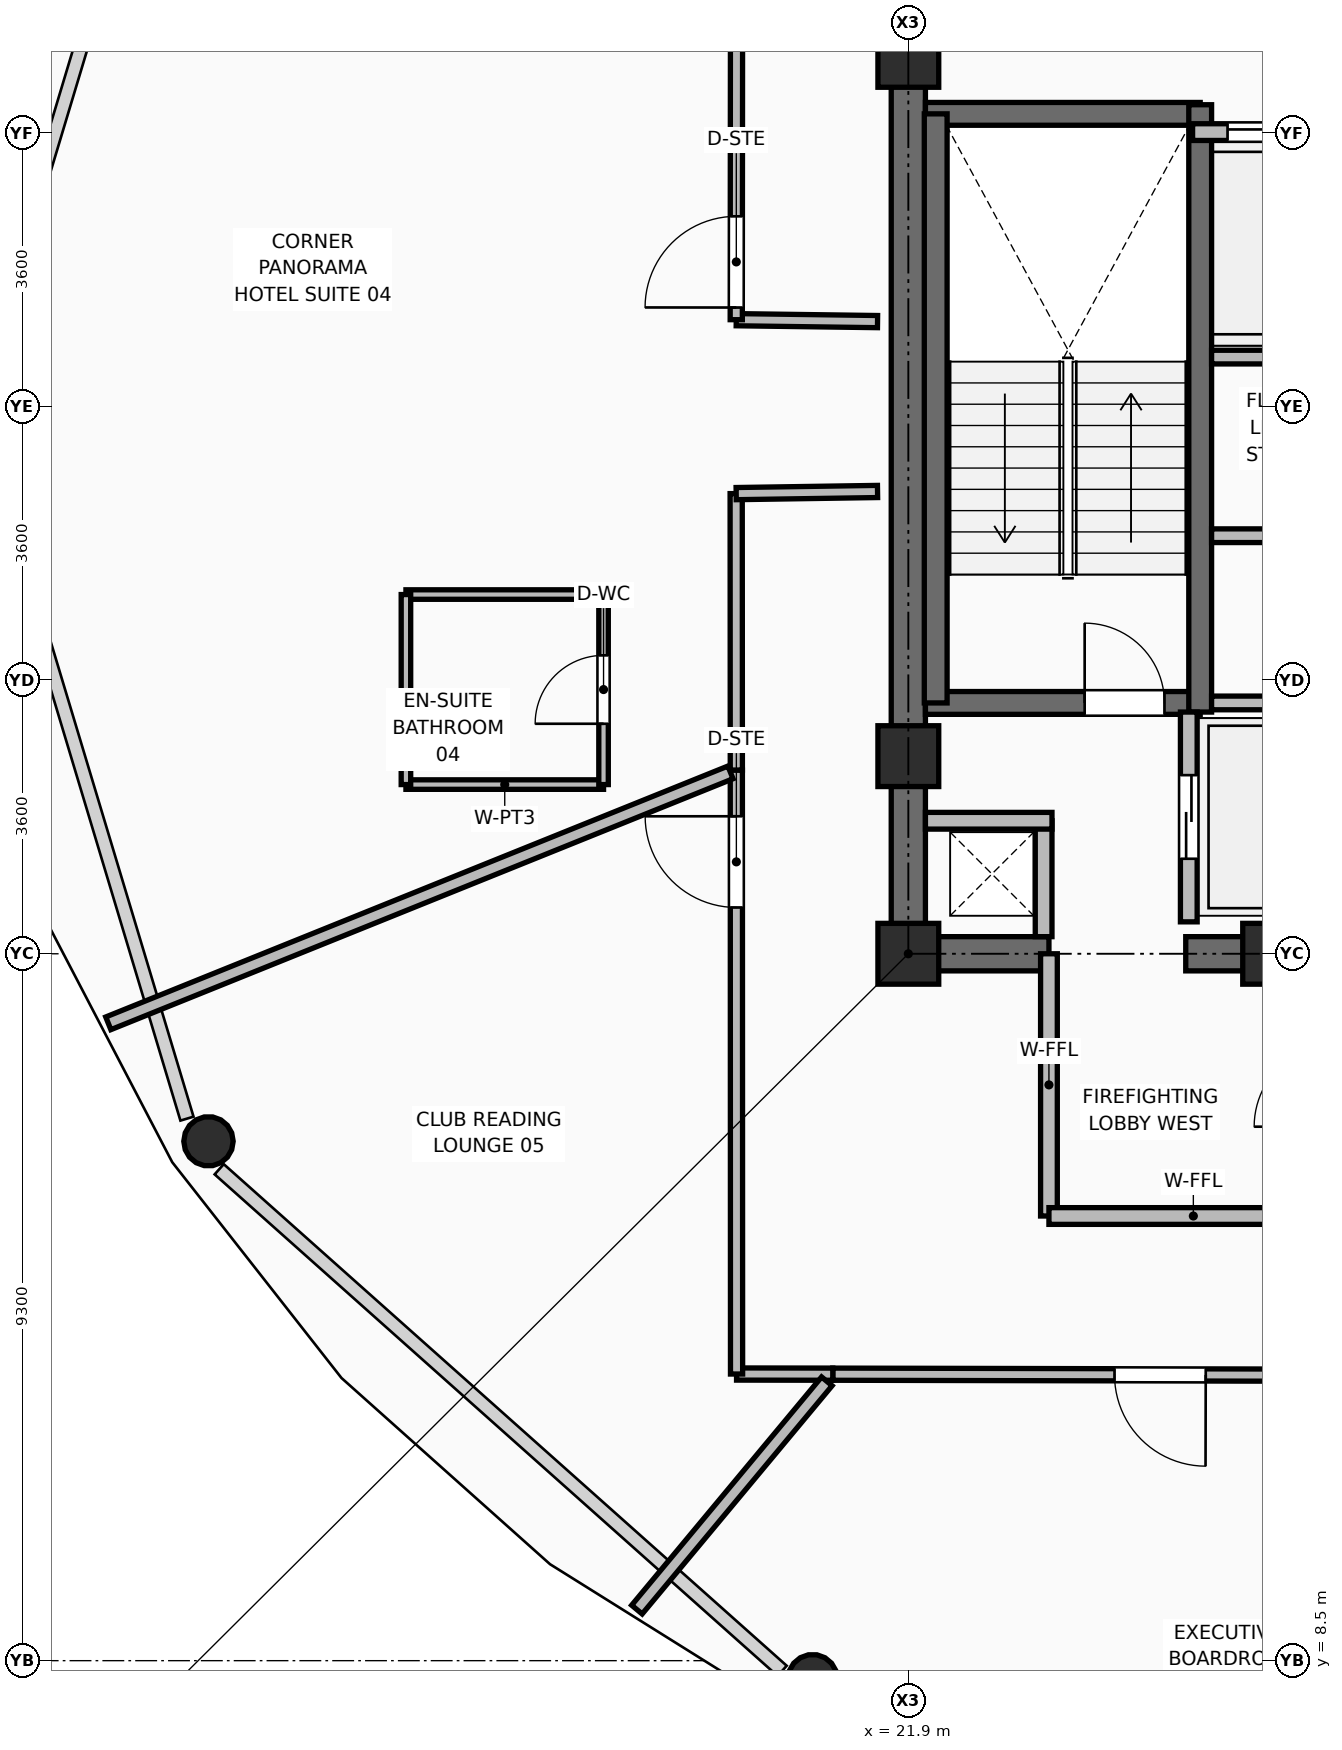
"""IFC4 building model, lengths in metres.
Left out: names, types, materials, properties, quantities, classifications, styles, units other than length and angle.
Written with IfcOpenShell. Run it as: python <this file> out.ifc"""

import sys

from ifc_helpers import new_model, si_unit, direction, frame, frame_2d, origin, origin_2d, place, context, subcontext, project, spatial, rectangle, hollow_circle, extrude, element, fill, save


model = new_model("IFC4")
c1 = context("Model", 3, precision=1e-05, world=origin(), true_north=direction((0.0, 1.0)))
c2 = subcontext(c1, "Body", "Model", "MODEL_VIEW")
j1 = project(units=[si_unit("LENGTHUNIT", "METRE"), si_unit("PLANEANGLEUNIT", "RADIAN")], contexts=[c1])
p1 = place(None, origin())
s1 = spatial("IfcSite", under=j1, at=p1, CompositionType="ELEMENT")
p2 = place(p1, origin())
s2 = spatial("IfcBuilding", under=s1, at=p2, CompositionType="ELEMENT")
p3 = place(p2, frame((0.0, 0.0, 246.15)))
s3 = spatial("IfcBuildingStorey", under=s2, at=p3, CompositionType="ELEMENT", Elevation=246.15)
for number, where, z_axis, x_axis in (
    (1, (21.9, 17.8, 0.0), (0.0, 0.0, 1.0), (1.0, 0.0, 0.0)),
    (2, (26.7, 17.8, 0.0), (0.0, 0.0, 1.0), (1.0, 0.0, 0.0)),
    (3, (21.9, 20.4, 0.0), (0.0, 0.0, 1.0), (1.0, 0.0, 0.0)),
    (4, (21.9, 29.6, 0.0), (0.0, 0.0, 1.0), (1.0, 0.0, 0.0)),
):
    element("IfcColumn", number, at=place(p3, frame(where, z_axis=z_axis, x_axis=x_axis)), inside=s3, PredefinedType="COLUMN", context=c2, shape_type="SweptSolid", body=[
        extrude(rectangle(XDim=0.8, YDim=0.8, at=origin_2d()), origin(), (0.0, 0.0, 1.0), 3.75),
    ])
for number, where, z_axis, x_axis in (
    (5, (12.692, 15.333, 0.0), (0.0, 0.0, 1.0), (1.0, 0.0, 0.0)),
    (6, (20.641, 8.257, 0.0), (0.0, 0.0, 1.0), (1.0, 0.0, 0.0)),
):
    element("IfcColumn", number, at=place(p3, frame(where, z_axis=z_axis, x_axis=x_axis)), inside=s3, PredefinedType="COLUMN", context=c2, shape_type="SweptSolid", body=[
        extrude(hollow_circle(Radius=0.325, WallThickness=0.03, at=origin_2d()), origin(), (0.0, 0.0, 1.0), 3.57),
    ])
p4 = place(p3, frame((21.675, 17.8, 0.0), z_axis=(0.0, 0.0, 1.0), x_axis=(1.0, 0.0, 0.0)))
e7 = element("IfcWall", 7, at=p4, inside=s3, PredefinedType="SHEAR", context=c2, shape_type="SweptSolid", body=[
    extrude(rectangle(XDim=2.075, YDim=0.45, at=frame_2d((1.038, 0.0))), origin(), (0.0, 0.0, 1.0), 3.57),
])
p5 = place(p3, frame((25.55, 17.8, 0.0), z_axis=(0.0, 0.0, 1.0), x_axis=(1.0, 0.0, 0.0)))
e8 = element("IfcWall", 8, at=p5, inside=s3, PredefinedType="SHEAR", context=c2, shape_type="SweptSolid", body=[
    extrude(rectangle(XDim=6.9, YDim=0.45, at=frame_2d((3.45, 0.0))), origin(), (0.0, 0.0, 1.0), 3.57),
])
p6 = place(p3, frame((21.9, 18.025, 0.0), z_axis=(0.0, 0.0, 1.0), x_axis=(0.0, 1.0, 0.0)))
e9 = element("IfcWall", 9, at=p6, inside=s3, PredefinedType="SHEAR", context=c2, shape_type="SweptSolid", body=[
    extrude(rectangle(XDim=14.2, YDim=0.45, at=frame_2d((7.1, 0.0))), origin(), (0.0, 0.0, 1.0), 3.57),
])
p7 = place(p3, frame((22.125, 21.1, 0.0), z_axis=(0.0, 0.0, 1.0), x_axis=(1.0, 0.0, 0.0)))
e10 = element("IfcWall", 10, at=p7, inside=s3, PredefinedType="SHEAR", context=c2, shape_type="SweptSolid", body=[
    extrude(rectangle(XDim=3.615, YDim=0.3, at=frame_2d((1.808, 0.0))), origin(), (0.0, 0.0, 1.0), 3.57),
])
p8 = place(p7, frame((2.095, 0.0, 0.0)))
e11 = element("IfcOpeningElement", 11, at=p8, cuts=e10, PredefinedType="OPENING", context=c2, shape_type="SweptSolid", body=[
    extrude(rectangle(XDim=1.05, YDim=2.1, at=frame_2d((0.525, 1.05))), frame((0.0, 0.16, 0.0), z_axis=(0.0, -1.0, 0.0), x_axis=(1.0, 0.0, 0.0)), (0.0, 0.0, 1.0), 0.32),
])
p9 = place(p3, frame((22.125, 28.85, 0.0), z_axis=(0.0, 0.0, 1.0), x_axis=(1.0, 0.0, 0.0)))
e12 = element("IfcWall", 12, at=p9, inside=s3, PredefinedType="SHEAR", context=c2, shape_type="SweptSolid", body=[
    extrude(rectangle(XDim=3.615, YDim=0.3, at=frame_2d((1.808, 0.0))), origin(), (0.0, 0.0, 1.0), 3.57),
])
p10 = place(p3, frame((25.74, 20.98, 0.0), z_axis=(0.0, 0.0, 1.0), x_axis=(0.0, 1.0, 0.0)))
e13 = element("IfcWall", 13, at=p10, inside=s3, PredefinedType="SHEAR", context=c2, shape_type="SweptSolid", body=[
    extrude(rectangle(XDim=7.99, YDim=0.3, at=frame_2d((3.995, 0.0))), origin(), (0.0, 0.0, 1.0), 3.57),
])
p11 = place(p3, frame((22.26, 21.1, 0.0), z_axis=(0.0, 0.0, 1.0), x_axis=(0.0, 1.0, 0.0)))
e14 = element("IfcWall", 14, at=p11, inside=s3, PredefinedType="SHEAR", context=c2, shape_type="SweptSolid", body=[
    extrude(rectangle(XDim=7.75, YDim=0.3, at=frame_2d((3.875, 0.0))), origin(), (0.0, 0.0, 1.0), 3.57),
])
p12 = place(p3, frame((23.68, 18.025, 0.0), z_axis=(0.0, 0.0, 1.0), x_axis=(0.0, 1.0, 0.0)))
e15 = element("IfcWall", 15, at=p12, inside=s3, PredefinedType="PARTITIONING", context=c2, shape_type="SweptSolid", body=[
    extrude(rectangle(XDim=1.525, YDim=0.22, at=frame_2d((0.763, 0.0))), origin(), (0.0, 0.0, 1.0), 3.55),
])
p13 = place(p3, frame((22.125, 19.55, 0.0), z_axis=(0.0, 0.0, 1.0), x_axis=(1.0, 0.0, 0.0)))
e16 = element("IfcWall", 16, at=p13, inside=s3, PredefinedType="PARTITIONING", context=c2, shape_type="SweptSolid", body=[
    extrude(rectangle(XDim=1.665, YDim=0.22, at=frame_2d((0.833, 0.0))), origin(), (0.0, 0.0, 1.0), 2.595),
])
p14 = place(p3, frame((25.59, 18.22, 0.0), z_axis=(0.0, 0.0, 1.0), x_axis=(0.0, 1.0, 0.0)))
e17 = element("IfcWall", 17, at=p14, inside=s3, PredefinedType="PARTITIONING", context=c2, shape_type="SweptSolid", body=[
    extrude(rectangle(XDim=2.76, YDim=0.22, at=frame_2d((1.38, 0.0))), origin(), (0.0, 0.0, 1.0), 3.55),
])
p15 = place(p14, frame((0.83, 0.0, 0.0)))
e18 = element("IfcOpeningElement", 18, at=p15, cuts=e17, PredefinedType="OPENING", context=c2, shape_type="SweptSolid", body=[
    extrude(rectangle(XDim=1.1, YDim=2.2, at=frame_2d((0.55, 1.1))), frame((0.0, 0.12, 0.0), z_axis=(0.0, -1.0, 0.0), x_axis=(1.0, 0.0, 0.0)), (0.0, 0.0, 1.0), 0.24),
])
p16 = place(p3, frame((25.64, 28.61, 0.0), z_axis=(0.0, 0.0, 1.0), x_axis=(1.0, 0.0, 0.0)))
e19 = element("IfcWall", 19, at=p16, inside=s3, PredefinedType="PARTITIONING", context=c2, shape_type="SweptSolid", body=[
    extrude(rectangle(XDim=2.02, YDim=0.22, at=frame_2d((1.01, 0.0))), origin(), (0.0, 0.0, 1.0), 3.55),
])
p17 = place(p16, frame((0.46, 0.0, 0.0)))
e20 = element("IfcOpeningElement", 20, at=p17, cuts=e19, PredefinedType="OPENING", context=c2, shape_type="SweptSolid", body=[
    extrude(rectangle(XDim=1.1, YDim=2.2, at=frame_2d((0.55, 1.1))), frame((0.0, 0.12, 0.0), z_axis=(0.0, -1.0, 0.0), x_axis=(1.0, 0.0, 0.0)), (0.0, 0.0, 1.0), 0.24),
])
for number, where, z_axis, x_axis in (
    (21, (25.89, 21.1, 0.0), (0.0, 0.0, 1.0), (1.0, 0.0, 0.0)),
    (22, (25.89, 25.65, 0.0), (0.0, 0.0, 1.0), (1.0, 0.0, 0.0)),
):
    element("IfcWall", number, at=place(p3, frame(where, z_axis=z_axis, x_axis=x_axis)), inside=s3, PredefinedType="PARTITIONING", context=c2, shape_type="SweptSolid", body=[
        extrude(rectangle(XDim=1.7, YDim=0.18, at=frame_2d((0.85, 0.0))), origin(), (0.0, 0.0, 1.0), 3.55),
    ])
p18 = place(p3, frame((25.89, 23.3, 0.0), z_axis=(0.0, 0.0, 1.0), x_axis=(1.0, 0.0, 0.0)))
e23 = element("IfcWall", 23, at=p18, inside=s3, PredefinedType="PARTITIONING", context=c2, shape_type="SweptSolid", body=[
    extrude(rectangle(XDim=1.79, YDim=0.18, at=frame_2d((0.895, 0.0))), origin(), (0.0, 0.0, 1.0), 3.55),
])
p19 = place(p3, frame((23.75, 14.35, 0.0), z_axis=(0.0, 0.0, 1.0), x_axis=(0.0, 1.0, 0.0)))
e24 = element("IfcWall", 24, at=p19, inside=s3, PredefinedType="PARTITIONING", context=c2, shape_type="SweptSolid", body=[
    extrude(rectangle(XDim=3.45, YDim=0.22, at=frame_2d((1.725, 0.0))), origin(), (0.0, 0.0, 1.0), 3.081),
])
p20 = place(p3, frame((23.75, 14.35, 0.0), z_axis=(0.0, 0.0, 1.0), x_axis=(1.0, 0.0, 0.0)))
e25 = element("IfcWall", 25, at=p20, inside=s3, PredefinedType="PARTITIONING", context=c2, shape_type="SweptSolid", body=[
    extrude(rectangle(XDim=3.8, YDim=0.22, at=frame_2d((1.9, 0.0))), origin(), (0.0, 0.0, 1.0), 3.55),
])
p21 = place(p3, frame((21.495, 26.117, 0.0), z_axis=(0.0, 0.0, 1.0), x_axis=(-0.999908537082, 0.013524698532, 0.0)))
e26 = element("IfcWall", 26, at=p21, inside=s3, PredefinedType="PARTITIONING", context=c2, shape_type="SweptSolid", body=[
    extrude(rectangle(XDim=1.859, YDim=0.16, at=frame_2d((0.93, 0.0))), origin(), (0.0, 0.0, 1.0), 2.595),
])
p22 = place(p3, frame((19.636, 26.142, 0.0), z_axis=(0.0, 0.0, 1.0), x_axis=(0.000920648448, 0.999999576203, 0.0)))
e27 = element("IfcWall", 27, at=p22, inside=s3, PredefinedType="PARTITIONING", context=c2, shape_type="SweptSolid", body=[
    extrude(rectangle(XDim=5.569, YDim=0.16, at=frame_2d((2.784, 0.0))), origin(), (0.0, 0.0, 1.0), 3.55),
])
p23 = place(p22, frame((0.16, 0.0, 0.0)))
e28 = element("IfcOpeningElement", 28, at=p23, cuts=e27, PredefinedType="OPENING", context=c2, shape_type="SweptSolid", body=[
    extrude(rectangle(XDim=1.2, YDim=2.1, at=frame_2d((0.6, 1.05))), frame((0.0, 0.09, 0.0), z_axis=(0.0, -1.0, 0.0), x_axis=(1.0, 0.0, 0.0)), (0.0, 0.0, 1.0), 0.18),
])
p24 = place(p3, frame((29.521, 12.251, 0.0), z_axis=(0.0, 0.0, 1.0), x_axis=(-0.999997801115, 0.002097084968, 0.0)))
e29 = element("IfcWall", 29, at=p24, inside=s3, PredefinedType="PARTITIONING", context=c2, shape_type="SweptSolid", body=[
    extrude(rectangle(XDim=8.615, YDim=0.16, at=frame_2d((4.308, 0.0))), origin(), (0.0, 0.0, 1.0), 3.081),
])
p25 = place(p24, frame((3.708, 0.0, 0.0)))
e30 = element("IfcOpeningElement", 30, at=p25, cuts=e29, PredefinedType="OPENING", context=c2, shape_type="SweptSolid", body=[
    extrude(rectangle(XDim=1.2, YDim=2.1, at=frame_2d((0.6, 1.05))), frame((0.0, 0.09, 0.0), z_axis=(0.0, -1.0, 0.0), x_axis=(1.0, 0.0, 0.0)), (0.0, 0.0, 1.0), 0.18),
])
p26 = place(p3, frame((20.906, 12.269, 0.0), z_axis=(0.0, 0.0, 1.0), x_axis=(-0.999998810172, 0.001542612897, 0.0)))
e31 = element("IfcWall", 31, at=p26, inside=s3, PredefinedType="PARTITIONING", context=c2, shape_type="SweptSolid", body=[
    extrude(rectangle(XDim=1.266, YDim=0.16, at=frame_2d((0.633, 0.0))), origin(), (0.0, 0.0, 1.0), 3.55),
])
p27 = place(p3, frame((19.64, 12.271, 0.0), z_axis=(0.0, 0.0, 1.0), x_axis=(-0.000368697551, 0.999999932031, 0.0)))
e32 = element("IfcWall", 32, at=p27, inside=s3, PredefinedType="PARTITIONING", context=c2, shape_type="SweptSolid", body=[
    extrude(rectangle(XDim=7.946, YDim=0.16, at=frame_2d((3.973, 0.0))), origin(), (0.0, 0.0, 1.0), 3.081),
])
p28 = place(p27, frame((6.138, 0.0, 0.0)))
e33 = element("IfcOpeningElement", 33, at=p28, cuts=e32, PredefinedType="OPENING", context=c2, shape_type="SweptSolid", body=[
    extrude(rectangle(XDim=1.2, YDim=2.1, at=frame_2d((0.6, 1.05))), frame((0.0, 0.09, 0.0), z_axis=(0.0, -1.0, 0.0), x_axis=(1.0, 0.0, 0.0)), (0.0, 0.0, 1.0), 0.18),
])
p29 = place(p3, frame((19.637, 20.217, 0.0), z_axis=(0.0, 0.0, 1.0), x_axis=(-0.000537020799, 0.999999855804, 0.0)))
e34 = element("IfcWall", 34, at=p29, inside=s3, PredefinedType="PARTITIONING", context=c2, shape_type="SweptSolid", body=[
    extrude(rectangle(XDim=3.637, YDim=0.16, at=frame_2d((1.818, 0.0))), origin(), (0.0, 0.0, 1.0), 3.081),
])
p30 = place(p3, frame((19.635, 23.854, 0.0), z_axis=(0.0, 0.0, 1.0), x_axis=(0.999886107392, 0.015092125259, 0.0)))
e35 = element("IfcWall", 35, at=p30, inside=s3, PredefinedType="PARTITIONING", context=c2, shape_type="SweptSolid", body=[
    extrude(rectangle(XDim=1.86, YDim=0.16, at=frame_2d((0.93, 0.0))), origin(), (0.0, 0.0, 1.0), 2.595),
])
p31 = place(p3, frame((19.56, 20.186, 0.0), z_axis=(0.0, 0.0, 1.0), x_axis=(-0.927433425778, -0.37398828959, 0.0)))
e36 = element("IfcWall", 36, at=p31, inside=s3, PredefinedType="PARTITIONING", context=c2, shape_type="SweptSolid", body=[
    extrude(rectangle(XDim=8.827, YDim=0.18, at=frame_2d((4.413, 0.0))), origin(), (0.0, 0.0, 1.0), 2.925),
])
p32 = place(p3, frame((20.828, 12.175, 0.0), z_axis=(0.0, 0.0, 1.0), x_axis=(-0.639631003839, -0.768682105248, 0.0)))
e37 = element("IfcWall", 37, at=p32, inside=s3, PredefinedType="PARTITIONING", context=c2, shape_type="SweptSolid", body=[
    extrude(rectangle(XDim=3.906, YDim=0.18, at=frame_2d((1.953, 0.0))), origin(), (0.0, 0.0, 1.0), 2.925),
])
p33 = place(p3, frame((15.29, 20.026, 0.0), z_axis=(0.0, 0.0, 1.0), x_axis=(1.0, 0.0, 0.0)))
e38 = element("IfcWall", 38, at=p33, inside=s3, PredefinedType="PARTITIONING", context=c2, shape_type="SweptSolid", body=[
    extrude(rectangle(XDim=2.6, YDim=0.125, at=frame_2d((1.3, 0.0))), origin(), (0.0, 0.0, 1.0), 3.55),
])
p34 = place(p3, frame((15.29, 22.526, 0.0), z_axis=(0.0, 0.0, 1.0), x_axis=(1.0, 0.0, 0.0)))
e39 = element("IfcWall", 39, at=p34, inside=s3, PredefinedType="PARTITIONING", context=c2, shape_type="SweptSolid", body=[
    extrude(rectangle(XDim=2.6, YDim=0.125, at=frame_2d((1.3, 0.0))), origin(), (0.0, 0.0, 1.0), 3.081),
])
p35 = place(p3, frame((15.29, 20.026, 0.0), z_axis=(0.0, 0.0, 1.0), x_axis=(0.0, 1.0, 0.0)))
e40 = element("IfcWall", 40, at=p35, inside=s3, PredefinedType="PARTITIONING", context=c2, shape_type="SweptSolid", body=[
    extrude(rectangle(XDim=2.5, YDim=0.125, at=frame_2d((1.25, 0.0))), origin(), (0.0, 0.0, 1.0), 3.55),
])
p36 = place(p3, frame((17.89, 20.026, 0.0), z_axis=(0.0, 0.0, 1.0), x_axis=(0.0, 1.0, 0.0)))
e41 = element("IfcWall", 41, at=p36, inside=s3, PredefinedType="PARTITIONING", context=c2, shape_type="SweptSolid", body=[
    extrude(rectangle(XDim=2.5, YDim=0.125, at=frame_2d((1.25, 0.0))), origin(), (0.0, 0.0, 1.0), 3.081),
])
p37 = place(p36, frame((0.8, 0.0, 0.0)))
e42 = element("IfcOpeningElement", 42, at=p37, cuts=e41, PredefinedType="OPENING", context=c2, shape_type="SweptSolid", body=[
    extrude(rectangle(XDim=0.9, YDim=2.1, at=frame_2d((0.45, 1.05))), frame((0.0, 0.073, 0.0), z_axis=(0.0, -1.0, 0.0), x_axis=(1.0, 0.0, 0.0)), (0.0, 0.0, 1.0), 0.145),
])
p38 = place(p8, origin())
e43 = element("IfcDoor", 43, at=p38, inside=s3, OperationType="SINGLE_SWING_LEFT", PredefinedType="DOOR", context=c2, shape_type="SweptSolid", body=[
    extrude(rectangle(XDim=1.05, YDim=2.1, at=frame_2d((0.525, 1.05))), frame((0.0, 0.025, 0.0), z_axis=(0.0, -1.0, 0.0), x_axis=(1.0, 0.0, 0.0)), (0.0, 0.0, 1.0), 0.05),
])
fill(e11, e43)
p39 = place(p15, origin())
e44 = element("IfcDoor", 44, at=p39, inside=s3, OperationType="DOUBLE_DOOR_SLIDING", PredefinedType="DOOR", context=c2, shape_type="SweptSolid", body=[
    extrude(rectangle(XDim=1.1, YDim=2.2, at=frame_2d((0.55, 1.1))), frame((0.0, 0.025, 0.0), z_axis=(0.0, -1.0, 0.0), x_axis=(1.0, 0.0, 0.0)), (0.0, 0.0, 1.0), 0.05),
])
fill(e18, e44)
p40 = place(p17, origin())
e45 = element("IfcDoor", 45, at=p40, inside=s3, OperationType="DOUBLE_DOOR_SLIDING", PredefinedType="DOOR", context=c2, shape_type="SweptSolid", body=[
    extrude(rectangle(XDim=1.1, YDim=2.2, at=frame_2d((0.55, 1.1))), frame((0.0, 0.025, 0.0), z_axis=(0.0, -1.0, 0.0), x_axis=(1.0, 0.0, 0.0)), (0.0, 0.0, 1.0), 0.05),
])
fill(e20, e45)
p41 = place(p37, origin())
e46 = element("IfcDoor", 46, at=p41, inside=s3, OperationType="SINGLE_SWING_LEFT", PredefinedType="DOOR", context=c2, shape_type="SweptSolid", body=[
    extrude(rectangle(XDim=0.9, YDim=2.1, at=frame_2d((0.45, 1.05))), frame((0.0, 0.025, 0.0), z_axis=(0.0, -1.0, 0.0), x_axis=(1.0, 0.0, 0.0)), (0.0, 0.0, 1.0), 0.05),
])
fill(e42, e46)
p42 = place(p23, origin())
e47 = element("IfcDoor", 47, at=p42, inside=s3, OperationType="SINGLE_SWING_LEFT", PredefinedType="DOOR", context=c2, shape_type="SweptSolid", body=[
    extrude(rectangle(XDim=1.2, YDim=2.1, at=frame_2d((0.6, 1.05))), frame((0.0, 0.025, 0.0), z_axis=(0.0, -1.0, 0.0), x_axis=(1.0, 0.0, 0.0)), (0.0, 0.0, 1.0), 0.05),
])
fill(e28, e47)
p43 = place(p28, origin())
e48 = element("IfcDoor", 48, at=p43, inside=s3, OperationType="SINGLE_SWING_RIGHT", PredefinedType="DOOR", context=c2, shape_type="SweptSolid", body=[
    extrude(rectangle(XDim=1.2, YDim=2.1, at=frame_2d((0.6, 1.05))), frame((0.0, 0.025, 0.0), z_axis=(0.0, -1.0, 0.0), x_axis=(1.0, 0.0, 0.0)), (0.0, 0.0, 1.0), 0.05),
])
fill(e33, e48)
p44 = place(p25, origin())
e49 = element("IfcDoor", 49, at=p44, inside=s3, OperationType="SINGLE_SWING_LEFT", PredefinedType="DOOR", context=c2, shape_type="SweptSolid", body=[
    extrude(rectangle(XDim=1.2, YDim=2.1, at=frame_2d((0.6, 1.05))), frame((0.0, 0.025, 0.0), z_axis=(0.0, -1.0, 0.0), x_axis=(1.0, 0.0, 0.0)), (0.0, 0.0, 1.0), 0.05),
])
fill(e30, e49)
save(model, sys.argv[1])
